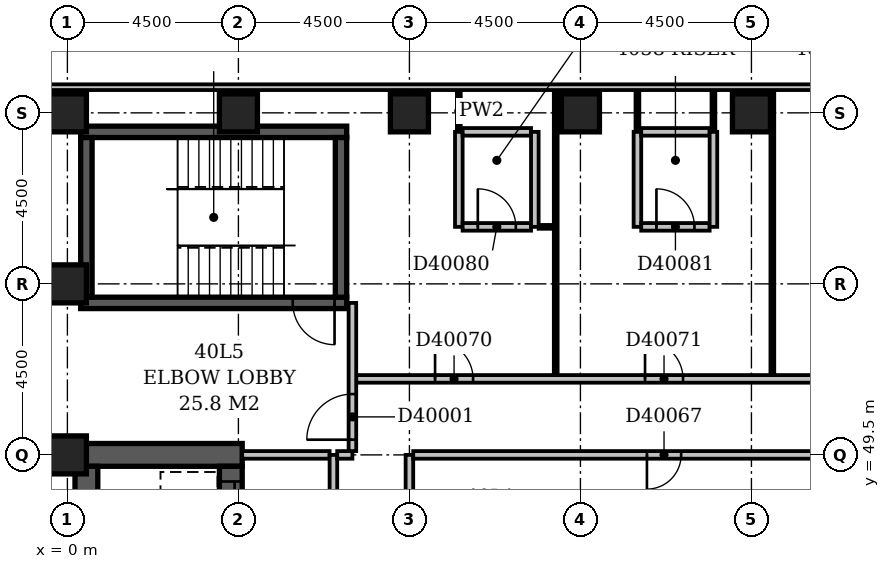
"""IFC4 building model, lengths in metres.
Left out: names, types, materials, properties, quantities, classifications, styles, units other than length and angle.
Written with IfcOpenShell. Run it as: python <this file> out.ifc"""

import sys

from ifc_helpers import new_model, si_unit, direction, frame, frame_2d, origin, origin_2d, place, context, subcontext, project, spatial, rectangle, extrude, element, fill, save


model = new_model("IFC4")
c1 = context("Model", 3, precision=1e-05, world=origin(), true_north=direction((0.0, 1.0)))
c2 = subcontext(c1, "Body", "Model", "MODEL_VIEW")
j1 = project(units=[si_unit("LENGTHUNIT", "METRE"), si_unit("PLANEANGLEUNIT", "RADIAN")], contexts=[c1])
p1 = place(None, origin())
s1 = spatial("IfcSite", under=j1, at=p1, CompositionType="ELEMENT")
p2 = place(p1, origin())
s2 = spatial("IfcBuilding", under=s1, at=p2, CompositionType="ELEMENT")
p3 = place(p2, frame((0.0, 0.0, 159.2)))
s3 = spatial("IfcBuildingStorey", under=s2, at=p3, CompositionType="ELEMENT", Elevation=159.2)
p4 = place(p3, frame((0.2, 49.5, -0.3), z_axis=(0.0, 0.0, 1.0), x_axis=(1.0, 0.0, 0.0)))
e1 = element("IfcWall", 1, at=p4, inside=s3, PredefinedType="SHEAR", context=c2, shape_type="SweptSolid", body=[
    extrude(rectangle(XDim=4.4, YDim=0.6, at=frame_2d((2.2, 0.0))), origin(), (0.0, 0.0, 1.0), 3.6),
])
p5 = place(p3, frame((0.35, 53.5, -0.3), z_axis=(0.0, 0.0, 1.0), x_axis=(1.0, 0.0, 0.0)))
e2 = element("IfcWall", 2, at=p5, inside=s3, PredefinedType="SHEAR", context=c2, shape_type="SweptSolid", body=[
    extrude(rectangle(XDim=7.0, YDim=0.3, at=frame_2d((3.5, 0.0))), origin(), (0.0, 0.0, 1.0), 3.6),
])
p6 = place(p5, frame((5.58, 0.0, 0.3)))
e3 = element("IfcOpeningElement", 3, at=p6, cuts=e2, PredefinedType="OPENING", context=c2, shape_type="SweptSolid", body=[
    extrude(rectangle(XDim=1.1, YDim=2.1, at=frame_2d((0.55, 1.05))), frame((0.0, 0.162, 0.0), z_axis=(0.0, -1.0, 0.0), x_axis=(1.0, 0.0, 0.0)), (0.0, 0.0, 1.0), 0.324),
])
p7 = place(p3, frame((0.35, 58.0, -0.3), z_axis=(0.0, 0.0, 1.0), x_axis=(1.0, 0.0, 0.0)))
e4 = element("IfcWall", 4, at=p7, inside=s3, PredefinedType="SHEAR", context=c2, shape_type="SweptSolid", body=[
    extrude(rectangle(XDim=7.0, YDim=0.3, at=frame_2d((3.5, 0.0))), origin(), (0.0, 0.0, 1.0), 3.6),
])
p8 = place(p3, frame((0.5, 27.15, -0.3), z_axis=(0.0, 0.0, 1.0), x_axis=(0.0, 1.0, 0.0)))
e5 = element("IfcWall", 5, at=p8, inside=s3, PredefinedType="SHEAR", context=c2, shape_type="SweptSolid", body=[
    extrude(rectangle(XDim=22.05, YDim=0.6, at=frame_2d((11.025, 0.0))), origin(), (0.0, 0.0, 1.0), 3.6),
])
p9 = place(p3, frame((0.5, 53.65, -0.3), z_axis=(0.0, 0.0, 1.0), x_axis=(0.0, 1.0, 0.0)))
e6 = element("IfcWall", 6, at=p9, inside=s3, PredefinedType="SHEAR", context=c2, shape_type="SweptSolid", body=[
    extrude(rectangle(XDim=4.2, YDim=0.3, at=frame_2d((2.1, 0.0))), origin(), (0.0, 0.0, 1.0), 3.6),
])
p10 = place(p3, frame((4.3, 27.15, -0.3), z_axis=(0.0, 0.0, 1.0), x_axis=(0.0, 1.0, 0.0)))
e7 = element("IfcWall", 7, at=p10, inside=s3, PredefinedType="SHEAR", context=c2, shape_type="SweptSolid", body=[
    extrude(rectangle(XDim=22.05, YDim=0.6, at=frame_2d((11.025, 0.0))), origin(), (0.0, 0.0, 1.0), 3.6),
])
p11 = place(p10, frame((3.05, 0.0, 0.3)))
e8 = element("IfcOpeningElement", 8, at=p11, cuts=e7, PredefinedType="OPENING", context=c2, shape_type="SweptSolid", body=[
    extrude(rectangle(XDim=1.1, YDim=2.1, at=frame_2d((0.55, 1.05))), frame((0.0, 0.312, 0.0), z_axis=(0.0, -1.0, 0.0), x_axis=(1.0, 0.0, 0.0)), (0.0, 0.0, 1.0), 0.624),
])
p12 = place(p10, frame((0.55, 0.0, 0.3)))
e9 = element("IfcOpeningElement", 9, at=p12, cuts=e7, PredefinedType="OPENING", context=c2, shape_type="SweptSolid", body=[
    extrude(rectangle(XDim=1.1, YDim=2.1, at=frame_2d((0.55, 1.05))), frame((0.0, 0.312, 0.0), z_axis=(0.0, -1.0, 0.0), x_axis=(1.0, 0.0, 0.0)), (0.0, 0.0, 1.0), 0.624),
])
p13 = place(p10, frame((20.55, 0.0, 0.3)))
e10 = element("IfcOpeningElement", 10, at=p13, cuts=e7, PredefinedType="OPENING", context=c2, shape_type="SweptSolid", body=[
    extrude(rectangle(XDim=1.1, YDim=2.1, at=frame_2d((0.55, 1.05))), frame((0.0, 0.312, 0.0), z_axis=(0.0, -1.0, 0.0), x_axis=(1.0, 0.0, 0.0)), (0.0, 0.0, 1.0), 0.624),
])
p14 = place(p10, frame((18.05, 0.0, 0.3)))
e11 = element("IfcOpeningElement", 11, at=p14, cuts=e7, PredefinedType="OPENING", context=c2, shape_type="SweptSolid", body=[
    extrude(rectangle(XDim=1.1, YDim=2.1, at=frame_2d((0.55, 1.05))), frame((0.0, 0.312, 0.0), z_axis=(0.0, -1.0, 0.0), x_axis=(1.0, 0.0, 0.0)), (0.0, 0.0, 1.0), 0.624),
])
p15 = place(p10, frame((15.55, 0.0, 0.3)))
e12 = element("IfcOpeningElement", 12, at=p15, cuts=e7, PredefinedType="OPENING", context=c2, shape_type="SweptSolid", body=[
    extrude(rectangle(XDim=1.1, YDim=2.1, at=frame_2d((0.55, 1.05))), frame((0.0, 0.312, 0.0), z_axis=(0.0, -1.0, 0.0), x_axis=(1.0, 0.0, 0.0)), (0.0, 0.0, 1.0), 0.624),
])
p16 = place(p10, frame((13.05, 0.0, 0.3)))
e13 = element("IfcOpeningElement", 13, at=p16, cuts=e7, PredefinedType="OPENING", context=c2, shape_type="SweptSolid", body=[
    extrude(rectangle(XDim=1.1, YDim=2.1, at=frame_2d((0.55, 1.05))), frame((0.0, 0.312, 0.0), z_axis=(0.0, -1.0, 0.0), x_axis=(1.0, 0.0, 0.0)), (0.0, 0.0, 1.0), 0.624),
])
p17 = place(p10, frame((10.55, 0.0, 0.3)))
e14 = element("IfcOpeningElement", 14, at=p17, cuts=e7, PredefinedType="OPENING", context=c2, shape_type="SweptSolid", body=[
    extrude(rectangle(XDim=1.1, YDim=2.1, at=frame_2d((0.55, 1.05))), frame((0.0, 0.312, 0.0), z_axis=(0.0, -1.0, 0.0), x_axis=(1.0, 0.0, 0.0)), (0.0, 0.0, 1.0), 0.624),
])
p18 = place(p10, frame((8.05, 0.0, 0.3)))
e15 = element("IfcOpeningElement", 15, at=p18, cuts=e7, PredefinedType="OPENING", context=c2, shape_type="SweptSolid", body=[
    extrude(rectangle(XDim=1.1, YDim=2.1, at=frame_2d((0.55, 1.05))), frame((0.0, 0.312, 0.0), z_axis=(0.0, -1.0, 0.0), x_axis=(1.0, 0.0, 0.0)), (0.0, 0.0, 1.0), 0.624),
])
p19 = place(p10, frame((5.55, 0.0, 0.3)))
e16 = element("IfcOpeningElement", 16, at=p19, cuts=e7, PredefinedType="OPENING", context=c2, shape_type="SweptSolid", body=[
    extrude(rectangle(XDim=1.1, YDim=2.1, at=frame_2d((0.55, 1.05))), frame((0.0, 0.312, 0.0), z_axis=(0.0, -1.0, 0.0), x_axis=(1.0, 0.0, 0.0)), (0.0, 0.0, 1.0), 0.624),
])
p20 = place(p3, frame((7.2, 53.65, -0.3), z_axis=(0.0, 0.0, 1.0), x_axis=(0.0, 1.0, 0.0)))
e17 = element("IfcWall", 17, at=p20, inside=s3, PredefinedType="SHEAR", context=c2, shape_type="SweptSolid", body=[
    extrude(rectangle(XDim=4.2, YDim=0.3, at=frame_2d((2.1, 0.0))), origin(), (0.0, 0.0, 1.0), 3.6),
])
for number, where, z_axis, x_axis in (
    (18, (0.0, 49.5, -0.3), (0.0, 0.0, 1.0), (1.0, 0.0, 0.0)),
    (19, (0.0, 54.0, -0.3), (0.0, 0.0, 1.0), (1.0, 0.0, 0.0)),
    (20, (0.0, 58.5, -0.3), (0.0, 0.0, 1.0), (1.0, 0.0, 0.0)),
    (21, (4.5, 58.5, -0.3), (0.0, 0.0, 1.0), (1.0, 0.0, 0.0)),
    (22, (9.0, 58.5, -0.3), (0.0, 0.0, 1.0), (1.0, 0.0, 0.0)),
    (23, (13.5, 58.5, -0.3), (0.0, 0.0, 1.0), (1.0, 0.0, 0.0)),
    (24, (18.0, 58.5, -0.3), (0.0, 0.0, 1.0), (1.0, 0.0, 0.0)),
):
    element("IfcColumn", number, at=place(p3, frame(where, z_axis=z_axis, x_axis=x_axis)), inside=s3, PredefinedType="COLUMN", context=c2, shape_type="SweptSolid", body=[
        extrude(rectangle(XDim=1.0, YDim=1.0, at=origin_2d()), origin(), (0.0, 0.0, 1.0), 3.6),
    ])
p21 = place(p3, frame((68.1, 59.175, 0.0), z_axis=(0.0, 0.0, 1.0), x_axis=(-1.0, 0.0, 0.0)))
e25 = element("IfcWall", 25, at=p21, inside=s3, PredefinedType="STANDARD", context=c2, shape_type="SweptSolid", body=[
    extrude(rectangle(XDim=68.85, YDim=0.15, at=frame_2d((34.425, 0.0))), origin(), (0.0, 0.0, 1.0), 2.7),
])
p22 = place(p21, frame((1.65, 0.0, 0.6)))
e26 = element("IfcOpeningElement", 26, at=p22, cuts=e25, PredefinedType="OPENING", context=c2, shape_type="SweptSolid", body=[
    extrude(rectangle(XDim=2.4, YDim=1.8, at=frame_2d((1.2, 0.9))), frame((0.0, 0.087, 0.0), z_axis=(0.0, -1.0, 0.0), x_axis=(1.0, 0.0, 0.0)), (0.0, 0.0, 1.0), 0.174),
])
p23 = place(p21, frame((6.15, 0.0, 0.6)))
e27 = element("IfcOpeningElement", 27, at=p23, cuts=e25, PredefinedType="OPENING", context=c2, shape_type="SweptSolid", body=[
    extrude(rectangle(XDim=2.4, YDim=1.8, at=frame_2d((1.2, 0.9))), frame((0.0, 0.087, 0.0), z_axis=(0.0, -1.0, 0.0), x_axis=(1.0, 0.0, 0.0)), (0.0, 0.0, 1.0), 0.174),
])
p24 = place(p21, frame((37.685, 0.0, 0.6)))
e28 = element("IfcOpeningElement", 28, at=p24, cuts=e25, PredefinedType="OPENING", context=c2, shape_type="SweptSolid", body=[
    extrude(rectangle(XDim=1.5, YDim=1.8, at=frame_2d((0.75, 0.9))), frame((0.0, 0.087, 0.0), z_axis=(0.0, -1.0, 0.0), x_axis=(1.0, 0.0, 0.0)), (0.0, 0.0, 1.0), 0.174),
])
p25 = place(p3, frame((7.0, 34.6, 0.0), z_axis=(0.0, 0.0, 1.0), x_axis=(0.0, 1.0, 0.0)))
e29 = element("IfcWall", 29, at=p25, inside=s3, PredefinedType="PARTITIONING", context=c2, shape_type="SweptSolid", body=[
    extrude(rectangle(XDim=14.9, YDim=0.2, at=frame_2d((7.45, 0.0))), origin(), (0.0, 0.0, 1.0), 3.3),
])
p26 = place(p25, frame((2.8, 0.0, 0.0)))
e30 = element("IfcOpeningElement", 30, at=p26, cuts=e29, PredefinedType="OPENING", context=c2, shape_type="SweptSolid", body=[
    extrude(rectangle(XDim=1.2, YDim=2.1, at=frame_2d((0.6, 1.05))), frame((0.0, 0.112, 0.0), z_axis=(0.0, -1.0, 0.0), x_axis=(1.0, 0.0, 0.0)), (0.0, 0.0, 1.0), 0.224),
])
p27 = place(p25, frame((9.8, 0.0, 0.0)))
e31 = element("IfcOpeningElement", 31, at=p27, cuts=e29, PredefinedType="OPENING", context=c2, shape_type="SweptSolid", body=[
    extrude(rectangle(XDim=1.2, YDim=2.1, at=frame_2d((0.6, 1.05))), frame((0.0, 0.112, 0.0), z_axis=(0.0, -1.0, 0.0), x_axis=(1.0, 0.0, 0.0)), (0.0, 0.0, 1.0), 0.224),
])
p28 = place(p3, frame((4.6, 49.5, 0.0), z_axis=(0.0, 0.0, 1.0), x_axis=(1.0, 0.0, 0.0)))
e32 = element("IfcWall", 32, at=p28, inside=s3, PredefinedType="PARTITIONING", context=c2, shape_type="SweptSolid", body=[
    extrude(rectangle(XDim=2.3, YDim=0.2, at=frame_2d((1.15, 0.0))), origin(), (0.0, 0.0, 1.0), 3.3),
])
p29 = place(p3, frame((7.1, 49.5, 0.0), z_axis=(0.0, 0.0, 1.0), x_axis=(1.0, 0.0, 0.0)))
e33 = element("IfcWall", 33, at=p29, inside=s3, PredefinedType="PARTITIONING", context=c2, shape_type="SweptSolid", body=[
    extrude(rectangle(XDim=0.4, YDim=0.2, at=frame_2d((0.2, 0.0))), origin(), (0.0, 0.0, 1.0), 3.3),
])
p30 = place(p3, frame((7.5, 49.6, 0.0), z_axis=(0.0, 0.0, 1.0), x_axis=(0.0, 1.0, 0.0)))
e34 = element("IfcWall", 34, at=p30, inside=s3, PredefinedType="PARTITIONING", context=c2, shape_type="SweptSolid", body=[
    extrude(rectangle(XDim=3.9, YDim=0.2, at=frame_2d((1.95, 0.0))), origin(), (0.0, 0.0, 1.0), 3.3),
])
p31 = place(p30, frame((0.3, 0.0, 0.0)))
e35 = element("IfcOpeningElement", 35, at=p31, cuts=e34, PredefinedType="OPENING", context=c2, shape_type="SweptSolid", body=[
    extrude(rectangle(XDim=1.2, YDim=2.1, at=frame_2d((0.6, 1.05))), frame((0.0, 0.112, 0.0), z_axis=(0.0, -1.0, 0.0), x_axis=(1.0, 0.0, 0.0)), (0.0, 0.0, 1.0), 0.224),
])
p32 = place(p3, frame((9.0, 34.75, 0.0), z_axis=(0.0, 0.0, 1.0), x_axis=(0.0, 1.0, 0.0)))
e36 = element("IfcWall", 36, at=p32, inside=s3, PredefinedType="PARTITIONING", context=c2, shape_type="SweptSolid", body=[
    extrude(rectangle(XDim=14.75, YDim=0.2, at=frame_2d((7.375, 0.0))), origin(), (0.0, 0.0, 1.0), 3.3),
])
p33 = place(p32, frame((3.0, 0.0, 0.0)))
e37 = element("IfcOpeningElement", 37, at=p33, cuts=e36, PredefinedType="OPENING", context=c2, shape_type="SweptSolid", body=[
    extrude(rectangle(XDim=0.9, YDim=2.1, at=frame_2d((0.45, 1.05))), frame((0.0, 0.112, 0.0), z_axis=(0.0, -1.0, 0.0), x_axis=(1.0, 0.0, 0.0)), (0.0, 0.0, 1.0), 0.224),
])
p34 = place(p3, frame((9.1, 49.5, 0.0), z_axis=(0.0, 0.0, 1.0), x_axis=(1.0, 0.0, 0.0)))
e38 = element("IfcWall", 38, at=p34, inside=s3, PredefinedType="PARTITIONING", context=c2, shape_type="SweptSolid", body=[
    extrude(rectangle(XDim=32.55, YDim=0.2, at=frame_2d((16.275, 0.0))), origin(), (0.0, 0.0, 1.0), 3.3),
])
p35 = place(p34, frame((18.8, 0.0, 0.0)))
e39 = element("IfcOpeningElement", 39, at=p35, cuts=e38, PredefinedType="OPENING", context=c2, shape_type="SweptSolid", body=[
    extrude(rectangle(XDim=1.0, YDim=2.1, at=frame_2d((0.5, 1.05))), frame((0.0, 0.112, 0.0), z_axis=(0.0, -1.0, 0.0), x_axis=(1.0, 0.0, 0.0)), (0.0, 0.0, 1.0), 0.224),
])
p36 = place(p34, frame((6.15, 0.0, 0.0)))
e40 = element("IfcOpeningElement", 40, at=p36, cuts=e38, PredefinedType="OPENING", context=c2, shape_type="SweptSolid", body=[
    extrude(rectangle(XDim=0.9, YDim=2.1, at=frame_2d((0.45, 1.05))), frame((0.0, 0.112, 0.0), z_axis=(0.0, -1.0, 0.0), x_axis=(1.0, 0.0, 0.0)), (0.0, 0.0, 1.0), 0.224),
])
p37 = place(p3, frame((7.6, 51.5, 0.0), z_axis=(0.0, 0.0, 1.0), x_axis=(1.0, 0.0, 0.0)))
e41 = element("IfcWall", 41, at=p37, inside=s3, PredefinedType="PARTITIONING", context=c2, shape_type="SweptSolid", body=[
    extrude(rectangle(XDim=15.3, YDim=0.2, at=frame_2d((7.65, 0.0))), origin(), (0.0, 0.0, 1.0), 3.3),
])
p38 = place(p37, frame((2.075, 0.0, 0.0)))
e42 = element("IfcOpeningElement", 42, at=p38, cuts=e41, PredefinedType="OPENING", context=c2, shape_type="SweptSolid", body=[
    extrude(rectangle(XDim=1.0, YDim=2.1, at=frame_2d((0.5, 1.05))), frame((0.0, 0.112, 0.0), z_axis=(0.0, -1.0, 0.0), x_axis=(1.0, 0.0, 0.0)), (0.0, 0.0, 1.0), 0.224),
])
p39 = place(p37, frame((7.6, 0.0, 0.0)))
e43 = element("IfcOpeningElement", 43, at=p39, cuts=e41, PredefinedType="OPENING", context=c2, shape_type="SweptSolid", body=[
    extrude(rectangle(XDim=1.0, YDim=2.1, at=frame_2d((0.5, 1.05))), frame((0.0, 0.112, 0.0), z_axis=(0.0, -1.0, 0.0), x_axis=(1.0, 0.0, 0.0)), (0.0, 0.0, 1.0), 0.224),
])
p40 = place(p37, frame((12.725, 0.0, 0.0)))
e44 = element("IfcOpeningElement", 44, at=p40, cuts=e41, PredefinedType="OPENING", context=c2, shape_type="SweptSolid", body=[
    extrude(rectangle(XDim=0.9, YDim=2.1, at=frame_2d((0.45, 1.05))), frame((0.0, 0.112, 0.0), z_axis=(0.0, -1.0, 0.0), x_axis=(1.0, 0.0, 0.0)), (0.0, 0.0, 1.0), 0.224),
])
for number, where, z_axis, x_axis in (
    (45, (12.85, 51.6, 0.0), (0.0, 0.0, 1.0), (0.0, 1.0, 0.0)),
    (46, (18.55, 51.6, 0.0), (0.0, 0.0, 1.0), (0.0, 1.0, 0.0)),
):
    element("IfcWall", number, at=place(p3, frame(where, z_axis=z_axis, x_axis=x_axis)), inside=s3, PredefinedType="PARTITIONING", context=c2, shape_type="SweptSolid", body=[
        extrude(rectangle(XDim=7.5, YDim=0.1, at=frame_2d((3.75, 0.0))), origin(), (0.0, 0.0, 1.0), 3.3),
    ])
p41 = place(p3, frame((10.3, 55.5, 0.0), z_axis=(0.0, 0.0, 1.0), x_axis=(0.0, 1.0, 0.0)))
e47 = element("IfcWall", 47, at=p41, inside=s3, PredefinedType="PARTITIONING", context=c2, shape_type="SweptSolid", body=[
    extrude(rectangle(XDim=2.5, YDim=0.2, at=frame_2d((1.25, 0.0))), origin(), (0.0, 0.0, 1.0), 3.3),
])
p42 = place(p3, frame((10.4, 55.5, 0.0), z_axis=(0.0, 0.0, 1.0), x_axis=(1.0, 0.0, 0.0)))
e48 = element("IfcWall", 48, at=p42, inside=s3, PredefinedType="PARTITIONING", context=c2, shape_type="SweptSolid", body=[
    extrude(rectangle(XDim=1.8, YDim=0.2, at=frame_2d((0.9, 0.0))), origin(), (0.0, 0.0, 1.0), 3.3),
])
p43 = place(p42, frame((0.4, 0.0, 0.0)))
e49 = element("IfcOpeningElement", 49, at=p43, cuts=e48, PredefinedType="OPENING", context=c2, shape_type="SweptSolid", body=[
    extrude(rectangle(XDim=1.0, YDim=2.1, at=frame_2d((0.5, 1.05))), frame((0.0, 0.112, 0.0), z_axis=(0.0, -1.0, 0.0), x_axis=(1.0, 0.0, 0.0)), (0.0, 0.0, 1.0), 0.224),
])
p44 = place(p3, frame((12.3, 55.5, 0.0), z_axis=(0.0, 0.0, 1.0), x_axis=(0.0, 1.0, 0.0)))
e50 = element("IfcWall", 50, at=p44, inside=s3, PredefinedType="PARTITIONING", context=c2, shape_type="SweptSolid", body=[
    extrude(rectangle(XDim=2.5, YDim=0.2, at=frame_2d((1.25, 0.0))), origin(), (0.0, 0.0, 1.0), 3.3),
])
p45 = place(p3, frame((12.4, 55.5, 0.0), z_axis=(0.0, 0.0, 1.0), x_axis=(1.0, 0.0, 0.0)))
e51 = element("IfcWall", 51, at=p45, inside=s3, PredefinedType="PARTITIONING", context=c2, shape_type="SweptSolid", body=[
    extrude(rectangle(XDim=0.4, YDim=0.1, at=frame_2d((0.2, 0.0))), origin(), (0.0, 0.0, 1.0), 3.3),
])
p46 = place(p3, frame((15.0, 55.5, 0.0), z_axis=(0.0, 0.0, 1.0), x_axis=(0.0, 1.0, 0.0)))
e52 = element("IfcWall", 52, at=p46, inside=s3, PredefinedType="PARTITIONING", context=c2, shape_type="SweptSolid", body=[
    extrude(rectangle(XDim=2.5, YDim=0.2, at=frame_2d((1.25, 0.0))), origin(), (0.0, 0.0, 1.0), 3.3),
])
p47 = place(p3, frame((15.1, 55.5, 0.0), z_axis=(0.0, 0.0, 1.0), x_axis=(1.0, 0.0, 0.0)))
e53 = element("IfcWall", 53, at=p47, inside=s3, PredefinedType="PARTITIONING", context=c2, shape_type="SweptSolid", body=[
    extrude(rectangle(XDim=1.8, YDim=0.2, at=frame_2d((0.9, 0.0))), origin(), (0.0, 0.0, 1.0), 3.3),
])
p48 = place(p47, frame((0.4, 0.0, 0.0)))
e54 = element("IfcOpeningElement", 54, at=p48, cuts=e53, PredefinedType="OPENING", context=c2, shape_type="SweptSolid", body=[
    extrude(rectangle(XDim=1.0, YDim=2.1, at=frame_2d((0.5, 1.05))), frame((0.0, 0.112, 0.0), z_axis=(0.0, -1.0, 0.0), x_axis=(1.0, 0.0, 0.0)), (0.0, 0.0, 1.0), 0.224),
])
p49 = place(p3, frame((17.0, 55.5, 0.0), z_axis=(0.0, 0.0, 1.0), x_axis=(0.0, 1.0, 0.0)))
e55 = element("IfcWall", 55, at=p49, inside=s3, PredefinedType="PARTITIONING", context=c2, shape_type="SweptSolid", body=[
    extrude(rectangle(XDim=2.5, YDim=0.2, at=frame_2d((1.25, 0.0))), origin(), (0.0, 0.0, 1.0), 3.3),
])
p50 = place(p3, frame((10.3, 58.0, 0.0), z_axis=(0.0, 0.0, 1.0), x_axis=(0.0, 1.0, 0.0)))
e56 = element("IfcWall", 56, at=p50, inside=s3, PredefinedType="PARTITIONING", context=c2, shape_type="SweptSolid", body=[
    extrude(rectangle(XDim=1.1, YDim=0.1, at=frame_2d((0.55, 0.0))), origin(), (0.0, 0.0, 1.0), 3.3),
])
p51 = place(p3, frame((10.4, 58.0, 0.0), z_axis=(0.0, 0.0, 1.0), x_axis=(1.0, 0.0, 0.0)))
e57 = element("IfcWall", 57, at=p51, inside=s3, PredefinedType="PARTITIONING", context=c2, shape_type="SweptSolid", body=[
    extrude(rectangle(XDim=1.8, YDim=0.2, at=frame_2d((0.9, 0.0))), origin(), (0.0, 0.0, 1.0), 3.3),
])
p52 = place(p3, frame((15.0, 58.0, 0.0), z_axis=(0.0, 0.0, 1.0), x_axis=(0.0, 1.0, 0.0)))
e58 = element("IfcWall", 58, at=p52, inside=s3, PredefinedType="PARTITIONING", context=c2, shape_type="SweptSolid", body=[
    extrude(rectangle(XDim=1.1, YDim=0.1, at=frame_2d((0.55, 0.0))), origin(), (0.0, 0.0, 1.0), 3.3),
])
p53 = place(p3, frame((15.1, 58.0, 0.0), z_axis=(0.0, 0.0, 1.0), x_axis=(1.0, 0.0, 0.0)))
e59 = element("IfcWall", 59, at=p53, inside=s3, PredefinedType="PARTITIONING", context=c2, shape_type="SweptSolid", body=[
    extrude(rectangle(XDim=1.8, YDim=0.2, at=frame_2d((0.9, 0.0))), origin(), (0.0, 0.0, 1.0), 3.3),
])
p54 = place(p3, frame((17.0, 58.0, 0.0), z_axis=(0.0, 0.0, 1.0), x_axis=(0.0, 1.0, 0.0)))
e60 = element("IfcWall", 60, at=p54, inside=s3, PredefinedType="PARTITIONING", context=c2, shape_type="SweptSolid", body=[
    extrude(rectangle(XDim=1.1, YDim=0.1, at=frame_2d((0.55, 0.0))), origin(), (0.0, 0.0, 1.0), 3.3),
])
p55 = place(p31, origin())
e61 = element("IfcDoor", 61, at=p55, inside=s3, OperationType="SINGLE_SWING_LEFT", PredefinedType="DOOR", context=c2, shape_type="SweptSolid", body=[
    extrude(rectangle(XDim=1.2, YDim=2.1, at=frame_2d((0.6, 1.05))), frame((0.0, 0.025, 0.0), z_axis=(0.0, -1.0, 0.0), x_axis=(1.0, 0.0, 0.0)), (0.0, 0.0, 1.0), 0.05),
])
fill(e35, e61)
p56 = place(p13, origin())
e62 = element("IfcDoor", 62, at=p56, inside=s3, OperationType="SLIDING_TO_LEFT", PredefinedType="DOOR", context=c2, shape_type="SweptSolid", body=[
    extrude(rectangle(XDim=1.1, YDim=2.1, at=frame_2d((0.55, 1.05))), frame((0.0, 0.025, 0.0), z_axis=(0.0, -1.0, 0.0), x_axis=(1.0, 0.0, 0.0)), (0.0, 0.0, 1.0), 0.05),
])
fill(e10, e62)
p57 = place(p6, origin())
e63 = element("IfcDoor", 63, at=p57, inside=s3, OperationType="SINGLE_SWING_RIGHT", PredefinedType="DOOR", context=c2, shape_type="SweptSolid", body=[
    extrude(rectangle(XDim=1.1, YDim=2.1, at=frame_2d((0.55, 1.05))), frame((0.0, 0.025, 0.0), z_axis=(0.0, -1.0, 0.0), x_axis=(1.0, 0.0, 0.0)), (0.0, 0.0, 1.0), 0.05),
])
fill(e3, e63)
p58 = place(p36, frame((0.9, 0.0, 0.0), z_axis=(0.0, 0.0, 1.0), x_axis=(-1.0, 0.0, 0.0)))
e64 = element("IfcDoor", 64, at=p58, inside=s3, OperationType="SINGLE_SWING_RIGHT", PredefinedType="DOOR", context=c2, shape_type="SweptSolid", body=[
    extrude(rectangle(XDim=0.9, YDim=2.1, at=frame_2d((0.45, 1.05))), frame((0.0, 0.025, 0.0), z_axis=(0.0, -1.0, 0.0), x_axis=(1.0, 0.0, 0.0)), (0.0, 0.0, 1.0), 0.05),
])
fill(e40, e64)
p59 = place(p38, origin())
e65 = element("IfcDoor", 65, at=p59, inside=s3, OperationType="SINGLE_SWING_LEFT", PredefinedType="DOOR", context=c2, shape_type="SweptSolid", body=[
    extrude(rectangle(XDim=1.0, YDim=2.1, at=frame_2d((0.5, 1.05))), frame((0.0, 0.025, 0.0), z_axis=(0.0, -1.0, 0.0), x_axis=(1.0, 0.0, 0.0)), (0.0, 0.0, 1.0), 0.05),
])
fill(e42, e65)
p60 = place(p39, origin())
e66 = element("IfcDoor", 66, at=p60, inside=s3, OperationType="SINGLE_SWING_LEFT", PredefinedType="DOOR", context=c2, shape_type="SweptSolid", body=[
    extrude(rectangle(XDim=1.0, YDim=2.1, at=frame_2d((0.5, 1.05))), frame((0.0, 0.025, 0.0), z_axis=(0.0, -1.0, 0.0), x_axis=(1.0, 0.0, 0.0)), (0.0, 0.0, 1.0), 0.05),
])
fill(e43, e66)
p61 = place(p43, origin())
e67 = element("IfcDoor", 67, at=p61, inside=s3, OperationType="SINGLE_SWING_LEFT", PredefinedType="DOOR", context=c2, shape_type="SweptSolid", body=[
    extrude(rectangle(XDim=1.0, YDim=2.1, at=frame_2d((0.5, 1.05))), frame((0.0, 0.025, 0.0), z_axis=(0.0, -1.0, 0.0), x_axis=(1.0, 0.0, 0.0)), (0.0, 0.0, 1.0), 0.05),
])
fill(e49, e67)
p62 = place(p48, origin())
e68 = element("IfcDoor", 68, at=p62, inside=s3, OperationType="SINGLE_SWING_LEFT", PredefinedType="DOOR", context=c2, shape_type="SweptSolid", body=[
    extrude(rectangle(XDim=1.0, YDim=2.1, at=frame_2d((0.5, 1.05))), frame((0.0, 0.025, 0.0), z_axis=(0.0, -1.0, 0.0), x_axis=(1.0, 0.0, 0.0)), (0.0, 0.0, 1.0), 0.05),
])
fill(e54, e68)
save(model, sys.argv[1])
